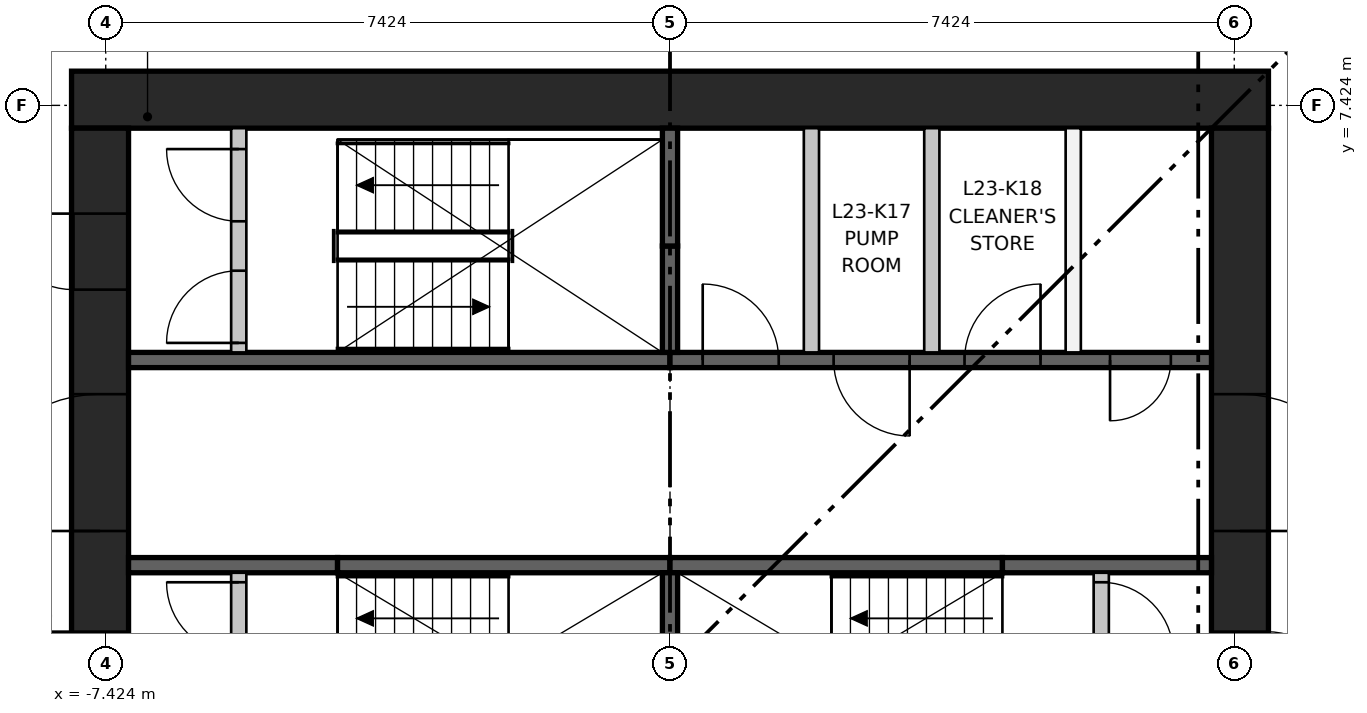
"""IFC4 building model, lengths in metres.
Left out: names, types, materials, properties, quantities, classifications, styles, units other than length and angle.
Written with IfcOpenShell. Run it as: python <this file> out.ifc"""

import sys

from ifc_helpers import new_model, si_unit, direction, frame, frame_2d, origin, place, context, subcontext, project, spatial, rectangle, extrude, element, fill, save


model = new_model("IFC4")
c1 = context("Model", 3, precision=1e-05, world=origin(), true_north=direction((0.0, 1.0)))
c2 = subcontext(c1, "Body", "Model", "MODEL_VIEW")
j1 = project(units=[si_unit("LENGTHUNIT", "METRE"), si_unit("PLANEANGLEUNIT", "RADIAN")], contexts=[c1])
p1 = place(None, origin())
s1 = spatial("IfcSite", under=j1, at=p1, CompositionType="ELEMENT")
p2 = place(p1, origin())
s2 = spatial("IfcBuilding", under=s1, at=p2, CompositionType="ELEMENT")
p3 = place(p2, frame((0.0, 0.0, 91.0)))
s3 = spatial("IfcBuildingStorey", under=s2, at=p3, CompositionType="ELEMENT", Elevation=91.0)
p4 = place(p3, frame((-7.874, 7.499, 0.0), z_axis=(0.0, 0.0, 1.0), x_axis=(1.0, 0.0, 0.0)))
e1 = element("IfcWall", 1, at=p4, inside=s3, PredefinedType="SHEAR", context=c2, shape_type="SweptSolid", body=[
    extrude(rectangle(XDim=15.748, YDim=0.75, at=frame_2d((7.874, 0.0))), origin(), (0.0, 0.0, 1.0), 3.65),
])
p5 = place(p3, frame((-7.499, -7.124, 0.0), z_axis=(0.0, 0.0, 1.0), x_axis=(0.0, 1.0, 0.0)))
e2 = element("IfcWall", 2, at=p5, inside=s3, PredefinedType="SHEAR", context=c2, shape_type="SweptSolid", body=[
    extrude(rectangle(XDim=14.248, YDim=0.75, at=frame_2d((7.124, 0.0))), origin(), (0.0, 0.0, 1.0), 3.65),
])
p6 = place(p5, frame((6.624, 0.0, 0.0)))
e3 = element("IfcOpeningElement", 3, at=p6, cuts=e2, PredefinedType="OPENING", context=c2, shape_type="SweptSolid", body=[
    extrude(rectangle(XDim=1.0, YDim=2.1, at=frame_2d((0.5, 1.05))), frame((0.0, 0.385, 0.0), z_axis=(0.0, -1.0, 0.0), x_axis=(1.0, 0.0, 0.0)), (0.0, 0.0, 1.0), 0.77),
])
p7 = place(p5, frame((3.5, 0.0, 0.0)))
e4 = element("IfcOpeningElement", 4, at=p7, cuts=e2, PredefinedType="OPENING", context=c2, shape_type="SweptSolid", body=[
    extrude(rectangle(XDim=1.8, YDim=2.1, at=frame_2d((0.9, 1.05))), frame((0.0, 0.385, 0.0), z_axis=(0.0, -1.0, 0.0), x_axis=(1.0, 0.0, 0.0)), (0.0, 0.0, 1.0), 0.77),
])
p8 = place(p5, frame((8.948, 0.0, 0.0)))
e5 = element("IfcOpeningElement", 5, at=p8, cuts=e2, PredefinedType="OPENING", context=c2, shape_type="SweptSolid", body=[
    extrude(rectangle(XDim=1.8, YDim=2.1, at=frame_2d((0.9, 1.05))), frame((0.0, 0.385, 0.0), z_axis=(0.0, -1.0, 0.0), x_axis=(1.0, 0.0, 0.0)), (0.0, 0.0, 1.0), 0.77),
])
p9 = place(p5, frame((12.124, 0.0, 0.0)))
e6 = element("IfcOpeningElement", 6, at=p9, cuts=e2, PredefinedType="OPENING", context=c2, shape_type="SweptSolid", body=[
    extrude(rectangle(XDim=1.0, YDim=2.1, at=frame_2d((0.5, 1.05))), frame((0.0, 0.385, 0.0), z_axis=(0.0, -1.0, 0.0), x_axis=(1.0, 0.0, 0.0)), (0.0, 0.0, 1.0), 0.77),
])
p10 = place(p3, frame((7.499, -7.124, 0.0), z_axis=(0.0, 0.0, 1.0), x_axis=(0.0, 1.0, 0.0)))
e7 = element("IfcWall", 7, at=p10, inside=s3, PredefinedType="SHEAR", context=c2, shape_type="SweptSolid", body=[
    extrude(rectangle(XDim=14.248, YDim=0.75, at=frame_2d((7.124, 0.0))), origin(), (0.0, 0.0, 1.0), 3.65),
])
p11 = place(p10, frame((6.624, 0.0, 0.0)))
e8 = element("IfcOpeningElement", 8, at=p11, cuts=e7, PredefinedType="OPENING", context=c2, shape_type="SweptSolid", body=[
    extrude(rectangle(XDim=1.0, YDim=2.1, at=frame_2d((0.5, 1.05))), frame((0.0, 0.385, 0.0), z_axis=(0.0, -1.0, 0.0), x_axis=(1.0, 0.0, 0.0)), (0.0, 0.0, 1.0), 0.77),
])
p12 = place(p10, frame((3.5, 0.0, 0.0)))
e9 = element("IfcOpeningElement", 9, at=p12, cuts=e7, PredefinedType="OPENING", context=c2, shape_type="SweptSolid", body=[
    extrude(rectangle(XDim=1.8, YDim=2.1, at=frame_2d((0.9, 1.05))), frame((0.0, 0.385, 0.0), z_axis=(0.0, -1.0, 0.0), x_axis=(1.0, 0.0, 0.0)), (0.0, 0.0, 1.0), 0.77),
])
p13 = place(p10, frame((8.948, 0.0, 0.0)))
e10 = element("IfcOpeningElement", 10, at=p13, cuts=e7, PredefinedType="OPENING", context=c2, shape_type="SweptSolid", body=[
    extrude(rectangle(XDim=1.8, YDim=2.1, at=frame_2d((0.9, 1.05))), frame((0.0, 0.385, 0.0), z_axis=(0.0, -1.0, 0.0), x_axis=(1.0, 0.0, 0.0)), (0.0, 0.0, 1.0), 0.77),
])
p14 = place(p3, frame((-7.124, 4.074, 0.0), z_axis=(0.0, 0.0, 1.0), x_axis=(1.0, 0.0, 0.0)))
e11 = element("IfcWall", 11, at=p14, inside=s3, PredefinedType="SHEAR", context=c2, shape_type="SweptSolid", body=[
    extrude(rectangle(XDim=7.124, YDim=0.2, at=frame_2d((3.562, 0.0))), origin(), (0.0, 0.0, 1.0), 3.3),
])
p15 = place(p3, frame((0.0, 4.074, 0.0), z_axis=(0.0, 0.0, 1.0), x_axis=(1.0, 0.0, 0.0)))
e12 = element("IfcWall", 12, at=p15, inside=s3, PredefinedType="SHEAR", context=c2, shape_type="SweptSolid", body=[
    extrude(rectangle(XDim=7.124, YDim=0.2, at=frame_2d((3.562, 0.0))), origin(), (0.0, 0.0, 1.0), 3.3),
])
p16 = place(p15, frame((0.43, 0.0, 0.0)))
e13 = element("IfcOpeningElement", 13, at=p16, cuts=e12, PredefinedType="OPENING", context=c2, shape_type="SweptSolid", body=[
    extrude(rectangle(XDim=1.0, YDim=2.1, at=frame_2d((0.5, 1.05))), frame((0.0, 0.11, 0.0), z_axis=(0.0, -1.0, 0.0), x_axis=(1.0, 0.0, 0.0)), (0.0, 0.0, 1.0), 0.22),
])
p17 = place(p15, frame((2.153, 0.0, 0.0)))
e14 = element("IfcOpeningElement", 14, at=p17, cuts=e12, PredefinedType="OPENING", context=c2, shape_type="SweptSolid", body=[
    extrude(rectangle(XDim=1.0, YDim=2.1, at=frame_2d((0.5, 1.05))), frame((0.0, 0.11, 0.0), z_axis=(0.0, -1.0, 0.0), x_axis=(1.0, 0.0, 0.0)), (0.0, 0.0, 1.0), 0.22),
])
p18 = place(p15, frame((3.875, 0.0, 0.0)))
e15 = element("IfcOpeningElement", 15, at=p18, cuts=e12, PredefinedType="OPENING", context=c2, shape_type="SweptSolid", body=[
    extrude(rectangle(XDim=1.0, YDim=2.1, at=frame_2d((0.5, 1.05))), frame((0.0, 0.11, 0.0), z_axis=(0.0, -1.0, 0.0), x_axis=(1.0, 0.0, 0.0)), (0.0, 0.0, 1.0), 0.22),
])
p19 = place(p15, frame((5.79, 0.0, 0.0)))
e16 = element("IfcOpeningElement", 16, at=p19, cuts=e12, PredefinedType="OPENING", context=c2, shape_type="SweptSolid", body=[
    extrude(rectangle(XDim=0.8, YDim=2.1, at=frame_2d((0.4, 1.05))), frame((0.0, 0.11, 0.0), z_axis=(0.0, -1.0, 0.0), x_axis=(1.0, 0.0, 0.0)), (0.0, 0.0, 1.0), 0.22),
])
p20 = place(p3, frame((-7.124, 1.375, 0.0), z_axis=(0.0, 0.0, 1.0), x_axis=(1.0, 0.0, 0.0)))
e17 = element("IfcWall", 17, at=p20, inside=s3, PredefinedType="SHEAR", context=c2, shape_type="SweptSolid", body=[
    extrude(rectangle(XDim=2.75, YDim=0.2, at=frame_2d((1.375, 0.0))), origin(), (0.0, 0.0, 1.0), 3.3),
])
for number, where, z_axis, x_axis in (
    (18, (-4.374, 1.375, 0.0), (0.0, 0.0, 1.0), (1.0, 0.0, 0.0)),
    (19, (0.0, 1.375, 0.0), (0.0, 0.0, 1.0), (1.0, 0.0, 0.0)),
):
    element("IfcWall", number, at=place(p3, frame(where, z_axis=z_axis, x_axis=x_axis)), inside=s3, PredefinedType="SHEAR", context=c2, shape_type="SweptSolid", body=[
        extrude(rectangle(XDim=4.374, YDim=0.2, at=frame_2d((2.187, 0.0))), origin(), (0.0, 0.0, 1.0), 3.3),
    ])
p21 = place(p3, frame((4.374, 1.375, 0.0), z_axis=(0.0, 0.0, 1.0), x_axis=(1.0, 0.0, 0.0)))
e20 = element("IfcWall", 20, at=p21, inside=s3, PredefinedType="SHEAR", context=c2, shape_type="SweptSolid", body=[
    extrude(rectangle(XDim=2.75, YDim=0.2, at=frame_2d((1.375, 0.0))), origin(), (0.0, 0.0, 1.0), 3.3),
])
p22 = place(p3, frame((0.0, -1.275, 0.0), z_axis=(0.0, 0.0, 1.0), x_axis=(0.0, 1.0, 0.0)))
e21 = element("IfcWall", 21, at=p22, inside=s3, PredefinedType="SHEAR", context=c2, shape_type="SweptSolid", body=[
    extrude(rectangle(XDim=2.55, YDim=0.2, at=frame_2d((1.275, 0.0))), origin(), (0.0, 0.0, 1.0), 3.3),
])
p23 = place(p3, frame((0.0, 4.174, 0.0), z_axis=(0.0, 0.0, 1.0), x_axis=(0.0, 1.0, 0.0)))
e22 = element("IfcWall", 22, at=p23, inside=s3, PredefinedType="SHEAR", context=c2, shape_type="SweptSolid", body=[
    extrude(rectangle(XDim=1.4, YDim=0.2, at=frame_2d((0.7, 0.0))), origin(), (0.0, 0.0, 1.0), 3.3),
])
p24 = place(p3, frame((0.0, 5.574, 0.0), z_axis=(0.0, 0.0, 1.0), x_axis=(0.0, 1.0, 0.0)))
e23 = element("IfcWall", 23, at=p24, inside=s3, PredefinedType="SHEAR", context=c2, shape_type="SweptSolid", body=[
    extrude(rectangle(XDim=1.55, YDim=0.2, at=frame_2d((0.775, 0.0))), origin(), (0.0, 0.0, 1.0), 3.3),
])
for number, where, z_axis, x_axis in (
    (24, (1.861, 4.174, 0.0), (0.0, 0.0, 1.0), (0.0, 1.0, 0.0)),
    (25, (3.445, 4.174, 0.0), (0.0, 0.0, 1.0), (0.0, 1.0, 0.0)),
    (26, (5.305, 4.174, 0.0), (0.0, 0.0, 1.0), (0.0, 1.0, 0.0)),
):
    element("IfcWall", number, at=place(p3, frame(where, z_axis=z_axis, x_axis=x_axis)), inside=s3, PredefinedType="PARTITIONING", context=c2, shape_type="SweptSolid", body=[
        extrude(rectangle(XDim=2.95, YDim=0.2, at=frame_2d((1.475, 0.0))), origin(), (0.0, 0.0, 1.0), 3.3),
    ])
p25 = place(p3, frame((-5.674, -1.275, 0.0), z_axis=(0.0, 0.0, 1.0), x_axis=(0.0, 1.0, 0.0)))
e27 = element("IfcWall", 27, at=p25, inside=s3, PredefinedType="PARTITIONING", context=c2, shape_type="SweptSolid", body=[
    extrude(rectangle(XDim=2.55, YDim=0.2, at=frame_2d((1.275, 0.0))), origin(), (0.0, 0.0, 1.0), 3.3),
])
p26 = place(p25, frame((0.125, 0.0, 0.0)))
e28 = element("IfcOpeningElement", 28, at=p26, cuts=e27, PredefinedType="OPENING", context=c2, shape_type="SweptSolid", body=[
    extrude(rectangle(XDim=0.95, YDim=2.1, at=frame_2d((0.475, 1.05))), frame((0.0, 0.11, 0.0), z_axis=(0.0, -1.0, 0.0), x_axis=(1.0, 0.0, 0.0)), (0.0, 0.0, 1.0), 0.22),
])
p27 = place(p25, frame((1.475, 0.0, 0.0)))
e29 = element("IfcOpeningElement", 29, at=p27, cuts=e27, PredefinedType="OPENING", context=c2, shape_type="SweptSolid", body=[
    extrude(rectangle(XDim=0.95, YDim=2.1, at=frame_2d((0.475, 1.05))), frame((0.0, 0.11, 0.0), z_axis=(0.0, -1.0, 0.0), x_axis=(1.0, 0.0, 0.0)), (0.0, 0.0, 1.0), 0.22),
])
p28 = place(p3, frame((5.674, -1.275, 0.0), z_axis=(0.0, 0.0, 1.0), x_axis=(0.0, 1.0, 0.0)))
e30 = element("IfcWall", 30, at=p28, inside=s3, PredefinedType="PARTITIONING", context=c2, shape_type="SweptSolid", body=[
    extrude(rectangle(XDim=2.55, YDim=0.2, at=frame_2d((1.275, 0.0))), origin(), (0.0, 0.0, 1.0), 3.3),
])
p29 = place(p28, frame((0.125, 0.0, 0.0)))
e31 = element("IfcOpeningElement", 31, at=p29, cuts=e30, PredefinedType="OPENING", context=c2, shape_type="SweptSolid", body=[
    extrude(rectangle(XDim=0.95, YDim=2.1, at=frame_2d((0.475, 1.05))), frame((0.0, 0.11, 0.0), z_axis=(0.0, -1.0, 0.0), x_axis=(1.0, 0.0, 0.0)), (0.0, 0.0, 1.0), 0.22),
])
p30 = place(p28, frame((1.475, 0.0, 0.0)))
e32 = element("IfcOpeningElement", 32, at=p30, cuts=e30, PredefinedType="OPENING", context=c2, shape_type="SweptSolid", body=[
    extrude(rectangle(XDim=0.95, YDim=2.1, at=frame_2d((0.475, 1.05))), frame((0.0, 0.11, 0.0), z_axis=(0.0, -1.0, 0.0), x_axis=(1.0, 0.0, 0.0)), (0.0, 0.0, 1.0), 0.22),
])
p31 = place(p3, frame((-5.674, 4.174, 0.0), z_axis=(0.0, 0.0, 1.0), x_axis=(0.0, 1.0, 0.0)))
e33 = element("IfcWall", 33, at=p31, inside=s3, PredefinedType="PARTITIONING", context=c2, shape_type="SweptSolid", body=[
    extrude(rectangle(XDim=2.95, YDim=0.2, at=frame_2d((1.475, 0.0))), origin(), (0.0, 0.0, 1.0), 3.3),
])
p32 = place(p31, frame((0.125, 0.0, 0.0)))
e34 = element("IfcOpeningElement", 34, at=p32, cuts=e33, PredefinedType="OPENING", context=c2, shape_type="SweptSolid", body=[
    extrude(rectangle(XDim=0.95, YDim=2.1, at=frame_2d((0.475, 1.05))), frame((0.0, 0.11, 0.0), z_axis=(0.0, -1.0, 0.0), x_axis=(1.0, 0.0, 0.0)), (0.0, 0.0, 1.0), 0.22),
])
p33 = place(p31, frame((1.725, 0.0, 0.0)))
e35 = element("IfcOpeningElement", 35, at=p33, cuts=e33, PredefinedType="OPENING", context=c2, shape_type="SweptSolid", body=[
    extrude(rectangle(XDim=0.95, YDim=2.1, at=frame_2d((0.475, 1.05))), frame((0.0, 0.11, 0.0), z_axis=(0.0, -1.0, 0.0), x_axis=(1.0, 0.0, 0.0)), (0.0, 0.0, 1.0), 0.22),
])
p34 = place(p27, origin())
e36 = element("IfcDoor", 36, at=p34, inside=s3, OperationType="SINGLE_SWING_RIGHT", PredefinedType="DOOR", context=c2, shape_type="SweptSolid", body=[
    extrude(rectangle(XDim=0.95, YDim=2.1, at=frame_2d((0.475, 1.05))), frame((0.0, 0.025, 0.0), z_axis=(0.0, -1.0, 0.0), x_axis=(1.0, 0.0, 0.0)), (0.0, 0.0, 1.0), 0.05),
])
fill(e29, e36)
p35 = place(p30, frame((0.95, 0.0, 0.0), z_axis=(0.0, 0.0, 1.0), x_axis=(-1.0, 0.0, 0.0)))
e37 = element("IfcDoor", 37, at=p35, inside=s3, OperationType="SINGLE_SWING_LEFT", PredefinedType="DOOR", context=c2, shape_type="SweptSolid", body=[
    extrude(rectangle(XDim=0.95, YDim=2.1, at=frame_2d((0.475, 1.05))), frame((0.0, 0.025, 0.0), z_axis=(0.0, -1.0, 0.0), x_axis=(1.0, 0.0, 0.0)), (0.0, 0.0, 1.0), 0.05),
])
fill(e32, e37)
p36 = place(p32, origin())
e38 = element("IfcDoor", 38, at=p36, inside=s3, OperationType="SINGLE_SWING_LEFT", PredefinedType="DOOR", context=c2, shape_type="SweptSolid", body=[
    extrude(rectangle(XDim=0.95, YDim=2.1, at=frame_2d((0.475, 1.05))), frame((0.0, 0.025, 0.0), z_axis=(0.0, -1.0, 0.0), x_axis=(1.0, 0.0, 0.0)), (0.0, 0.0, 1.0), 0.05),
])
fill(e34, e38)
p37 = place(p33, origin())
e39 = element("IfcDoor", 39, at=p37, inside=s3, OperationType="SINGLE_SWING_RIGHT", PredefinedType="DOOR", context=c2, shape_type="SweptSolid", body=[
    extrude(rectangle(XDim=0.95, YDim=2.1, at=frame_2d((0.475, 1.05))), frame((0.0, 0.025, 0.0), z_axis=(0.0, -1.0, 0.0), x_axis=(1.0, 0.0, 0.0)), (0.0, 0.0, 1.0), 0.05),
])
fill(e35, e39)
p38 = place(p16, origin())
e40 = element("IfcDoor", 40, at=p38, inside=s3, OperationType="SINGLE_SWING_LEFT", PredefinedType="DOOR", context=c2, shape_type="SweptSolid", body=[
    extrude(rectangle(XDim=1.0, YDim=2.1, at=frame_2d((0.5, 1.05))), frame((0.0, 0.025, 0.0), z_axis=(0.0, -1.0, 0.0), x_axis=(1.0, 0.0, 0.0)), (0.0, 0.0, 1.0), 0.05),
])
fill(e13, e40)
p39 = place(p17, frame((1.0, 0.0, 0.0), z_axis=(0.0, 0.0, 1.0), x_axis=(-1.0, 0.0, 0.0)))
e41 = element("IfcDoor", 41, at=p39, inside=s3, OperationType="SINGLE_SWING_RIGHT", PredefinedType="DOOR", context=c2, shape_type="SweptSolid", body=[
    extrude(rectangle(XDim=1.0, YDim=2.1, at=frame_2d((0.5, 1.05))), frame((0.0, 0.025, 0.0), z_axis=(0.0, -1.0, 0.0), x_axis=(1.0, 0.0, 0.0)), (0.0, 0.0, 1.0), 0.05),
])
fill(e14, e41)
p40 = place(p18, origin())
e42 = element("IfcDoor", 42, at=p40, inside=s3, OperationType="SINGLE_SWING_RIGHT", PredefinedType="DOOR", context=c2, shape_type="SweptSolid", body=[
    extrude(rectangle(XDim=1.0, YDim=2.1, at=frame_2d((0.5, 1.05))), frame((0.0, 0.025, 0.0), z_axis=(0.0, -1.0, 0.0), x_axis=(1.0, 0.0, 0.0)), (0.0, 0.0, 1.0), 0.05),
])
fill(e15, e42)
p41 = place(p19, frame((0.8, 0.0, 0.0), z_axis=(0.0, 0.0, 1.0), x_axis=(-1.0, 0.0, 0.0)))
e43 = element("IfcDoor", 43, at=p41, inside=s3, OperationType="SINGLE_SWING_LEFT", PredefinedType="DOOR", context=c2, shape_type="SweptSolid", body=[
    extrude(rectangle(XDim=0.8, YDim=2.1, at=frame_2d((0.4, 1.05))), frame((0.0, 0.025, 0.0), z_axis=(0.0, -1.0, 0.0), x_axis=(1.0, 0.0, 0.0)), (0.0, 0.0, 1.0), 0.05),
])
fill(e16, e43)
p42 = place(p6, origin())
e44 = element("IfcDoor", 44, at=p42, inside=s3, OperationType="SINGLE_SWING_RIGHT", PredefinedType="DOOR", context=c2, shape_type="SweptSolid", body=[
    extrude(rectangle(XDim=1.0, YDim=2.1, at=frame_2d((0.5, 1.05))), frame((0.0, 0.375, 0.0), z_axis=(0.0, -1.0, 0.0), x_axis=(1.0, 0.0, 0.0)), (0.0, 0.0, 1.0), 0.05),
])
fill(e3, e44)
p43 = place(p8, origin())
e45 = element("IfcDoor", 45, at=p43, inside=s3, OperationType="DOUBLE_DOOR_SINGLE_SWING", PredefinedType="DOOR", context=c2, shape_type="SweptSolid", body=[
    extrude(rectangle(XDim=1.8, YDim=2.1, at=frame_2d((0.9, 1.05))), frame((0.0, 0.025, 0.0), z_axis=(0.0, -1.0, 0.0), x_axis=(1.0, 0.0, 0.0)), (0.0, 0.0, 1.0), 0.05),
])
fill(e5, e45)
p44 = place(p9, origin())
e46 = element("IfcDoor", 46, at=p44, inside=s3, OperationType="SINGLE_SWING_RIGHT", PredefinedType="DOOR", context=c2, shape_type="SweptSolid", body=[
    extrude(rectangle(XDim=1.0, YDim=2.1, at=frame_2d((0.5, 1.05))), frame((0.0, 0.375, 0.0), z_axis=(0.0, -1.0, 0.0), x_axis=(1.0, 0.0, 0.0)), (0.0, 0.0, 1.0), 0.05),
])
fill(e6, e46)
p45 = place(p11, frame((1.0, 0.0, 0.0), z_axis=(0.0, 0.0, 1.0), x_axis=(-1.0, 0.0, 0.0)))
e47 = element("IfcDoor", 47, at=p45, inside=s3, OperationType="SINGLE_SWING_LEFT", PredefinedType="DOOR", context=c2, shape_type="SweptSolid", body=[
    extrude(rectangle(XDim=1.0, YDim=2.1, at=frame_2d((0.5, 1.05))), frame((0.0, 0.375, 0.0), z_axis=(0.0, -1.0, 0.0), x_axis=(1.0, 0.0, 0.0)), (0.0, 0.0, 1.0), 0.05),
])
fill(e8, e47)
p46 = place(p13, frame((1.8, 0.0, 0.0), z_axis=(0.0, 0.0, 1.0), x_axis=(-1.0, 0.0, 0.0)))
e48 = element("IfcDoor", 48, at=p46, inside=s3, OperationType="DOUBLE_DOOR_SINGLE_SWING", PredefinedType="DOOR", context=c2, shape_type="SweptSolid", body=[
    extrude(rectangle(XDim=1.8, YDim=2.1, at=frame_2d((0.9, 1.05))), frame((0.0, 0.025, 0.0), z_axis=(0.0, -1.0, 0.0), x_axis=(1.0, 0.0, 0.0)), (0.0, 0.0, 1.0), 0.05),
])
fill(e10, e48)
save(model, sys.argv[1])
